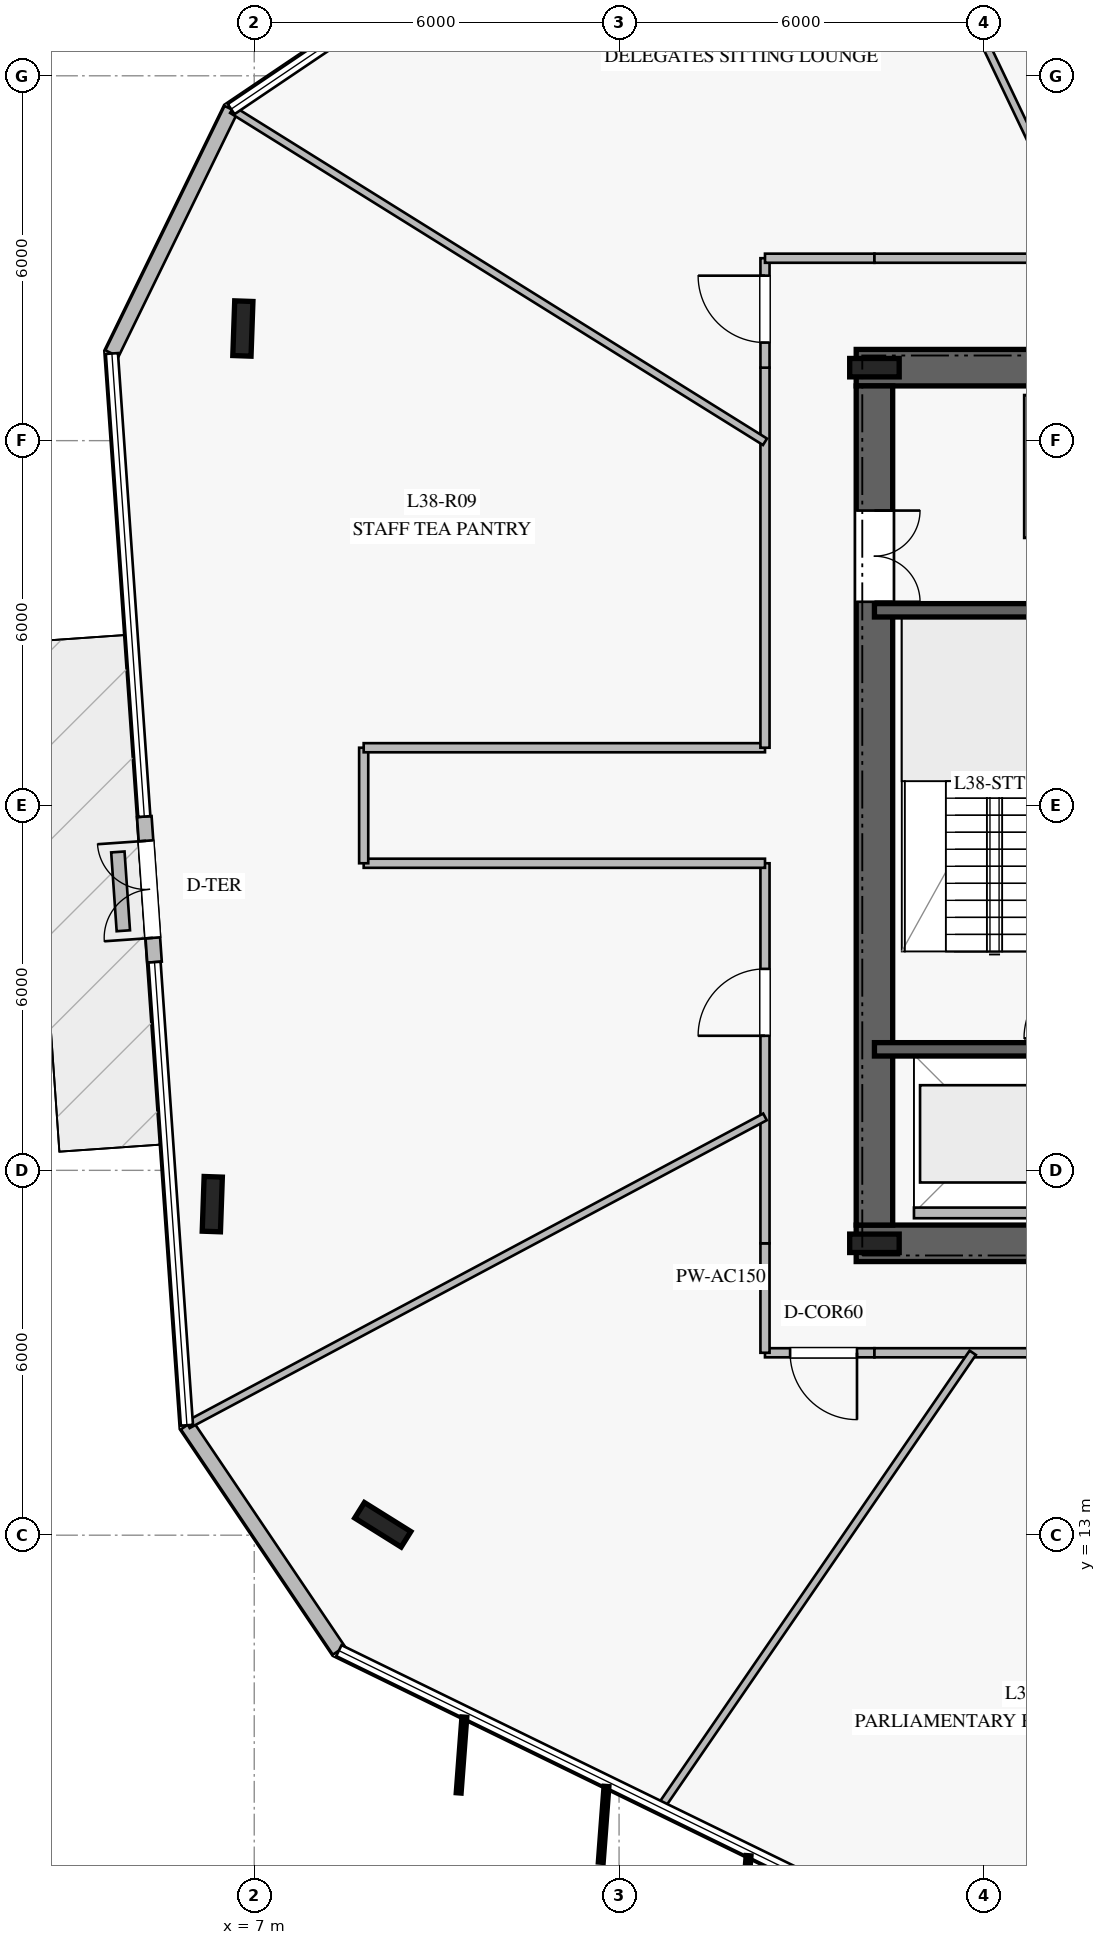
"""IFC4 building model, lengths in metres.
Left out: names, types, materials, properties, quantities, classifications, styles, units other than length and angle.
Written with IfcOpenShell. Run it as: python <this file> out.ifc"""

import sys

from ifc_helpers import new_model, si_unit, direction, frame, frame_2d, origin, origin_2d, place, context, subcontext, project, spatial, rectangle, i_section, extrude, element, fill, save


model = new_model("IFC4")
c1 = context("Model", 3, precision=1e-05, world=origin(), true_north=direction((0.0, 1.0)))
c2 = subcontext(c1, "Body", "Model", "MODEL_VIEW")
j1 = project(units=[si_unit("LENGTHUNIT", "METRE"), si_unit("PLANEANGLEUNIT", "RADIAN")], contexts=[c1])
p1 = place(None, origin())
s1 = spatial("IfcSite", under=j1, at=p1, CompositionType="ELEMENT")
p2 = place(p1, origin())
s2 = spatial("IfcBuilding", under=s1, at=p2, CompositionType="ELEMENT")
p3 = place(p2, frame((0.0, 0.0, 158.4)))
s3 = spatial("IfcBuildingStorey", under=s2, at=p3, CompositionType="ELEMENT", Elevation=158.4)
p4 = place(p3, frame((16.9, 17.8, 0.0), z_axis=(0.0, 0.0, 1.0), x_axis=(1.0, 0.0, 0.0)))
e1 = element("IfcWall", 1, at=p4, inside=s3, PredefinedType="SHEAR", context=c2, shape_type="SweptSolid", body=[
    extrude(rectangle(XDim=16.2, YDim=0.6, at=frame_2d((8.1, 0.0))), origin(), (0.0, 0.0, 1.0), 3.76),
])
p5 = place(p4, frame((5.05, 0.0, 0.0)))
e2 = element("IfcOpeningElement", 2, at=p5, cuts=e1, PredefinedType="OPENING", context=c2, shape_type="SweptSolid", body=[
    extrude(rectangle(XDim=1.2, YDim=2.25, at=frame_2d((0.6, 1.125))), frame((0.0, 0.31, 0.0), z_axis=(0.0, -1.0, 0.0), x_axis=(1.0, 0.0, 0.0)), (0.0, 0.0, 1.0), 0.62),
])
p6 = place(p4, frame((14.0, 0.0, 0.0)))
e3 = element("IfcOpeningElement", 3, at=p6, cuts=e1, PredefinedType="OPENING", context=c2, shape_type="SweptSolid", body=[
    extrude(rectangle(XDim=0.9, YDim=2.1, at=frame_2d((0.45, 1.05))), frame((0.0, 0.31, 0.0), z_axis=(0.0, -1.0, 0.0), x_axis=(1.0, 0.0, 0.0)), (0.0, 0.0, 1.0), 0.62),
])
p7 = place(p4, frame((9.25, 0.0, 0.0)))
e4 = element("IfcOpeningElement", 4, at=p7, cuts=e1, PredefinedType="OPENING", context=c2, shape_type="SweptSolid", body=[
    extrude(rectangle(XDim=1.1, YDim=2.2, at=frame_2d((0.55, 1.1))), frame((0.0, 0.31, 0.0), z_axis=(0.0, -1.0, 0.0), x_axis=(1.0, 0.0, 0.0)), (0.0, 0.0, 1.0), 0.62),
])
p8 = place(p3, frame((33.1, 32.2, 0.0), z_axis=(0.0, 0.0, 1.0), x_axis=(-1.0, 0.0, 0.0)))
e5 = element("IfcWall", 5, at=p8, inside=s3, PredefinedType="SHEAR", context=c2, shape_type="SweptSolid", body=[
    extrude(rectangle(XDim=16.2, YDim=0.6, at=frame_2d((8.1, 0.0))), origin(), (0.0, 0.0, 1.0), 3.76),
])
p9 = place(p8, frame((5.05, 0.0, 0.0)))
e6 = element("IfcOpeningElement", 6, at=p9, cuts=e5, PredefinedType="OPENING", context=c2, shape_type="SweptSolid", body=[
    extrude(rectangle(XDim=1.2, YDim=2.25, at=frame_2d((0.6, 1.125))), frame((0.0, 0.31, 0.0), z_axis=(0.0, -1.0, 0.0), x_axis=(1.0, 0.0, 0.0)), (0.0, 0.0, 1.0), 0.62),
])
p10 = place(p8, frame((11.85, 0.0, 0.0)))
e7 = element("IfcOpeningElement", 7, at=p10, cuts=e5, PredefinedType="OPENING", context=c2, shape_type="SweptSolid", body=[
    extrude(rectangle(XDim=1.1, YDim=2.2, at=frame_2d((0.55, 1.1))), frame((0.0, 0.31, 0.0), z_axis=(0.0, -1.0, 0.0), x_axis=(1.0, 0.0, 0.0)), (0.0, 0.0, 1.0), 0.62),
])
p11 = place(p8, frame((9.875, 0.0, 0.0)))
e8 = element("IfcOpeningElement", 8, at=p11, cuts=e5, PredefinedType="OPENING", context=c2, shape_type="SweptSolid", body=[
    extrude(rectangle(XDim=1.1, YDim=2.2, at=frame_2d((0.55, 1.1))), frame((0.0, 0.31, 0.0), z_axis=(0.0, -1.0, 0.0), x_axis=(1.0, 0.0, 0.0)), (0.0, 0.0, 1.0), 0.62),
])
p12 = place(p8, frame((7.9, 0.0, 0.0)))
e9 = element("IfcOpeningElement", 9, at=p12, cuts=e5, PredefinedType="OPENING", context=c2, shape_type="SweptSolid", body=[
    extrude(rectangle(XDim=1.1, YDim=2.2, at=frame_2d((0.55, 1.1))), frame((0.0, 0.31, 0.0), z_axis=(0.0, -1.0, 0.0), x_axis=(1.0, 0.0, 0.0)), (0.0, 0.0, 1.0), 0.62),
])
p13 = place(p3, frame((17.2, 31.9, 0.0), z_axis=(0.0, 0.0, 1.0), x_axis=(0.0, -1.0, 0.0)))
e10 = element("IfcWall", 10, at=p13, inside=s3, PredefinedType="SHEAR", context=c2, shape_type="SweptSolid", body=[
    extrude(rectangle(XDim=13.8, YDim=0.6, at=frame_2d((6.9, 0.0))), origin(), (0.0, 0.0, 1.0), 3.76),
])
p14 = place(p13, frame((2.05, 0.0, 0.0)))
e11 = element("IfcOpeningElement", 11, at=p14, cuts=e10, PredefinedType="OPENING", context=c2, shape_type="SweptSolid", body=[
    extrude(rectangle(XDim=1.5, YDim=2.2, at=frame_2d((0.75, 1.1))), frame((0.0, 0.31, 0.0), z_axis=(0.0, -1.0, 0.0), x_axis=(1.0, 0.0, 0.0)), (0.0, 0.0, 1.0), 0.62),
])
for number, where, z_axis, x_axis in (
    (12, (17.2, 17.8, 0.0), (0.0, 0.0, 1.0), (1.0, 0.0, 0.0)),
    (13, (17.2, 32.2, 0.0), (0.0, 0.0, 1.0), (1.0, 0.0, 0.0)),
):
    element("IfcColumn", number, at=place(p3, frame(where, z_axis=z_axis, x_axis=x_axis)), inside=s3, PredefinedType="COLUMN", context=c2, shape_type="SweptSolid", body=[
        extrude(i_section(OverallWidth=0.303, OverallDepth=0.814, WebThickness=0.021, FlangeThickness=0.04, at=origin_2d()), origin(), (0.0, 0.0, 1.0), 4.0),
    ])
for number, where, z_axis, x_axis in (
    (14, (17.2, 20.99, 0.0), (0.0, 0.0, 1.0), (1.0, 0.0, 0.0)),
    (15, (17.2, 28.21, 0.0), (0.0, 0.0, 1.0), (1.0, 0.0, 0.0)),
):
    element("IfcWall", number, at=place(p3, frame(where, z_axis=z_axis, x_axis=x_axis)), inside=s3, PredefinedType="SOLIDWALL", context=c2, shape_type="SweptSolid", body=[
        extrude(rectangle(XDim=3.72, YDim=0.22, at=frame_2d((1.86, 0.0))), origin(), (0.0, 0.0, 1.0), 3.76),
    ])
for number, where, z_axis, x_axis in (
    (16, (6.813, 32.844, 0.0), (0.0, 0.0, 1.0), (0.035, 0.999, 0.0)),
    (17, (6.31, 18.444, 0.0), (0.0, 0.0, 1.0), (0.035, 0.999, 0.0)),
    (18, (9.114, 13.171, 0.0), (0.0, 0.0, 1.0), (-0.848, 0.53, 0.0)),
):
    element("IfcColumn", number, at=place(p3, frame(where, z_axis=z_axis, x_axis=x_axis)), inside=s3, PredefinedType="COLUMN", context=c2, shape_type="SweptSolid", body=[
        extrude(i_section(OverallWidth=0.3, OverallDepth=0.9, WebThickness=0.019, FlangeThickness=0.035, at=origin_2d()), origin(), (0.0, 0.0, 1.0), 4.0),
    ])
p15 = place(p3, frame((6.62, 36.452, 0.0), z_axis=(0.0, 0.0, 1.0), x_axis=(-0.438566687479, -0.898698648399, 0.0)))
e19 = element("IfcWall", 19, at=p15, inside=s3, PredefinedType="STANDARD", context=c2, shape_type="SweptSolid", body=[
    extrude(rectangle(XDim=4.472, YDim=0.24, at=frame_2d((2.236, 0.0))), origin(), (0.0, 0.0, 1.0), 3.76),
])
p16 = place(p3, frame((5.192, 24.818, 0.0), z_axis=(0.0, 0.0, 1.0), x_axis=(0.070090302694, -0.997540650534, 0.0)))
e20 = element("IfcWall", 20, at=p16, inside=s3, PredefinedType="STANDARD", context=c2, shape_type="SweptSolid", body=[
    extrude(rectangle(XDim=2.4, YDim=0.24, at=frame_2d((1.2, 0.0))), origin(), (0.0, 0.0, 1.0), 3.76),
])
p17 = place(p16, frame((0.4, 0.0, 0.0)))
e21 = element("IfcOpeningElement", 21, at=p17, cuts=e20, PredefinedType="OPENING", context=c2, shape_type="SweptSolid", body=[
    extrude(rectangle(XDim=1.6, YDim=2.25, at=frame_2d((0.8, 1.125))), frame((0.0, 0.13, 0.0), z_axis=(0.0, -1.0, 0.0), x_axis=(1.0, 0.0, 0.0)), (0.0, 0.0, 1.0), 0.26),
])
p18 = place(p3, frame((5.893, 14.808, 0.0), z_axis=(0.0, 0.0, 1.0), x_axis=(0.559078804203, -0.82911452206, 0.0)))
e22 = element("IfcWall", 22, at=p18, inside=s3, PredefinedType="STANDARD", context=c2, shape_type="SweptSolid", body=[
    extrude(rectangle(XDim=4.47, YDim=0.24, at=frame_2d((2.235, 0.0))), origin(), (0.0, 0.0, 1.0), 3.76),
])
p19 = place(p3, frame((4.757, 24.236, 0.0), z_axis=(0.0, 0.0, 1.0), x_axis=(0.069150329694, -0.997606250934, 0.0)))
e23 = element("IfcWall", 23, at=p19, inside=s3, PredefinedType="USERDEFINED", context=c2, shape_type="SweptSolid", body=[
    extrude(rectangle(XDim=1.299, YDim=0.22, at=frame_2d((0.65, 0.0))), origin(), (0.0, 0.0, 1.0), 0.4),
])
p20 = place(p3, frame((19.75, 29.4, 0.0), z_axis=(0.0, 0.0, 1.0), x_axis=(0.0, 1.0, 0.0)))
e24 = element("IfcWall", 24, at=p20, inside=s3, PredefinedType="PARTITIONING", context=c2, shape_type="SweptSolid", body=[
    extrude(rectangle(XDim=2.35, YDim=0.175, at=frame_2d((1.175, 0.0))), origin(), (0.0, 0.0, 1.0), 3.76),
])
p21 = place(p3, frame((17.85, 18.3, 0.0), z_axis=(0.0, 0.0, 1.0), x_axis=(1.0, 0.0, 0.0)))
e25 = element("IfcWall", 25, at=p21, inside=s3, PredefinedType="PARTITIONING", context=c2, shape_type="SweptSolid", body=[
    extrude(rectangle(XDim=2.6, YDim=0.175, at=frame_2d((1.3, 0.0))), origin(), (0.0, 0.0, 1.0), 3.76),
])
p22 = place(p3, frame((17.2, 16.0, 0.0), z_axis=(0.0, 0.0, 1.0), x_axis=(-1.0, 0.0, 0.0)))
e26 = element("IfcWall", 26, at=p22, inside=s3, PredefinedType="PARTITIONING", context=c2, shape_type="SweptSolid", body=[
    extrude(rectangle(XDim=1.8, YDim=0.15, at=frame_2d((0.9, 0.0))), origin(), (0.0, 0.0, 1.0), 3.36),
])
p23 = place(p22, frame((0.287, 0.0, 0.0)))
e27 = element("IfcOpeningElement", 27, at=p23, cuts=e26, PredefinedType="OPENING", context=c2, shape_type="SweptSolid", body=[
    extrude(rectangle(XDim=1.1, YDim=2.2, at=frame_2d((0.55, 1.1))), frame((0.0, 0.085, 0.0), z_axis=(0.0, -1.0, 0.0), x_axis=(1.0, 0.0, 0.0)), (0.0, 0.0, 1.0), 0.17),
])
p24 = place(p3, frame((15.4, 16.0, 0.0), z_axis=(0.0, 0.0, 1.0), x_axis=(0.0, 1.0, 0.0)))
e28 = element("IfcWall", 28, at=p24, inside=s3, PredefinedType="PARTITIONING", context=c2, shape_type="SweptSolid", body=[
    extrude(rectangle(XDim=1.8, YDim=0.15, at=frame_2d((0.9, 0.0))), origin(), (0.0, 0.0, 1.0), 3.21),
])
p25 = place(p3, frame((15.4, 17.8, 0.0), z_axis=(0.0, 0.0, 1.0), x_axis=(0.0, 1.0, 0.0)))
e29 = element("IfcWall", 29, at=p25, inside=s3, PredefinedType="PARTITIONING", context=c2, shape_type="SweptSolid", body=[
    extrude(rectangle(XDim=6.25, YDim=0.15, at=frame_2d((3.125, 0.0))), origin(), (0.0, 0.0, 1.0), 3.21),
])
p26 = place(p25, frame((3.413, 0.0, 0.0)))
e30 = element("IfcOpeningElement", 30, at=p26, cuts=e29, PredefinedType="OPENING", context=c2, shape_type="SweptSolid", body=[
    extrude(rectangle(XDim=1.1, YDim=2.2, at=frame_2d((0.55, 1.1))), frame((0.0, 0.085, 0.0), z_axis=(0.0, -1.0, 0.0), x_axis=(1.0, 0.0, 0.0)), (0.0, 0.0, 1.0), 0.17),
])
p27 = place(p3, frame((15.4, 24.05, 0.0), z_axis=(0.0, 0.0, 1.0), x_axis=(-1.0, 0.0, 0.0)))
e31 = element("IfcWall", 31, at=p27, inside=s3, PredefinedType="PARTITIONING", context=c2, shape_type="SweptSolid", body=[
    extrude(rectangle(XDim=6.6, YDim=0.15, at=frame_2d((3.3, 0.0))), origin(), (0.0, 0.0, 1.0), 3.05),
])
p28 = place(p3, frame((8.8, 24.05, 0.0), z_axis=(0.0, 0.0, 1.0), x_axis=(0.0, 1.0, 0.0)))
e32 = element("IfcWall", 32, at=p28, inside=s3, PredefinedType="PARTITIONING", context=c2, shape_type="SweptSolid", body=[
    extrude(rectangle(XDim=1.9, YDim=0.15, at=frame_2d((0.95, 0.0))), origin(), (0.0, 0.0, 1.0), 3.25),
])
p29 = place(p3, frame((8.8, 25.95, 0.0), z_axis=(0.0, 0.0, 1.0), x_axis=(1.0, 0.0, 0.0)))
e33 = element("IfcWall", 33, at=p29, inside=s3, PredefinedType="PARTITIONING", context=c2, shape_type="SweptSolid", body=[
    extrude(rectangle(XDim=6.6, YDim=0.15, at=frame_2d((3.3, 0.0))), origin(), (0.0, 0.0, 1.0), 3.05),
])
p30 = place(p3, frame((15.4, 25.95, 0.0), z_axis=(0.0, 0.0, 1.0), x_axis=(0.0, 1.0, 0.0)))
e34 = element("IfcWall", 34, at=p30, inside=s3, PredefinedType="PARTITIONING", context=c2, shape_type="SweptSolid", body=[
    extrude(rectangle(XDim=6.25, YDim=0.15, at=frame_2d((3.125, 0.0))), origin(), (0.0, 0.0, 1.0), 3.21),
])
p31 = place(p3, frame((15.4, 32.2, 0.0), z_axis=(0.0, 0.0, 1.0), x_axis=(0.0, 1.0, 0.0)))
e35 = element("IfcWall", 35, at=p31, inside=s3, PredefinedType="PARTITIONING", context=c2, shape_type="SweptSolid", body=[
    extrude(rectangle(XDim=1.8, YDim=0.15, at=frame_2d((0.9, 0.0))), origin(), (0.0, 0.0, 1.0), 3.21),
])
p32 = place(p31, frame((0.413, 0.0, 0.0)))
e36 = element("IfcOpeningElement", 36, at=p32, cuts=e35, PredefinedType="OPENING", context=c2, shape_type="SweptSolid", body=[
    extrude(rectangle(XDim=1.1, YDim=2.2, at=frame_2d((0.55, 1.1))), frame((0.0, 0.085, 0.0), z_axis=(0.0, -1.0, 0.0), x_axis=(1.0, 0.0, 0.0)), (0.0, 0.0, 1.0), 0.17),
])
p33 = place(p3, frame((15.4, 34.0, 0.0), z_axis=(0.0, 0.0, 1.0), x_axis=(1.0, 0.0, 0.0)))
e37 = element("IfcWall", 37, at=p33, inside=s3, PredefinedType="PARTITIONING", context=c2, shape_type="SweptSolid", body=[
    extrude(rectangle(XDim=1.8, YDim=0.15, at=frame_2d((0.9, 0.0))), origin(), (0.0, 0.0, 1.0), 3.76),
])
p34 = place(p3, frame((17.2, 34.0, 0.0), z_axis=(0.0, 0.0, 1.0), x_axis=(1.0, 0.0, 0.0)))
e38 = element("IfcWall", 38, at=p34, inside=s3, PredefinedType="PARTITIONING", context=c2, shape_type="SweptSolid", body=[
    extrude(rectangle(XDim=6.85, YDim=0.15, at=frame_2d((3.425, 0.0))), origin(), (0.0, 0.0, 1.0), 3.21),
])
p35 = place(p34, frame((4.339, 0.0, 0.0)))
e39 = element("IfcOpeningElement", 39, at=p35, cuts=e38, PredefinedType="OPENING", context=c2, shape_type="SweptSolid", body=[
    extrude(rectangle(XDim=1.1, YDim=2.2, at=frame_2d((0.55, 1.1))), frame((0.0, 0.085, 0.0), z_axis=(0.0, -1.0, 0.0), x_axis=(1.0, 0.0, 0.0)), (0.0, 0.0, 1.0), 0.17),
])
p36 = place(p3, frame((24.05, 16.0, 0.0), z_axis=(0.0, 0.0, 1.0), x_axis=(-1.0, 0.0, 0.0)))
e40 = element("IfcWall", 40, at=p36, inside=s3, PredefinedType="PARTITIONING", context=c2, shape_type="SweptSolid", body=[
    extrude(rectangle(XDim=6.85, YDim=0.15, at=frame_2d((3.425, 0.0))), origin(), (0.0, 0.0, 1.0), 3.21),
])
p37 = place(p3, frame((20.705, 34.0, 0.0), z_axis=(0.0, 0.0, 1.0), x_axis=(-0.430753986645, 0.902469391719, 0.0)))
e41 = element("IfcWall", 41, at=p37, inside=s3, PredefinedType="PARTITIONING", context=c2, shape_type="SweptSolid", body=[
    extrude(rectangle(XDim=10.001, YDim=0.125, at=frame_2d((5.0, 0.0))), origin(), (0.0, 0.0, 1.0), 3.16),
])
p38 = place(p3, frame((15.4, 30.981, 0.0), z_axis=(0.0, 0.0, 1.0), x_axis=(-0.848716115213, 0.528848707833, 0.0)))
e42 = element("IfcWall", 42, at=p38, inside=s3, PredefinedType="PARTITIONING", context=c2, shape_type="SweptSolid", body=[
    extrude(rectangle(XDim=10.326, YDim=0.125, at=frame_2d((5.163, 0.0))), origin(), (0.0, 0.0, 1.0), 3.16),
])
p39 = place(p3, frame((15.4, 19.879, 0.0), z_axis=(0.0, 0.0, 1.0), x_axis=(-0.882346658186, -0.470600015712, 0.0)))
e43 = element("IfcWall", 43, at=p39, inside=s3, PredefinedType="PARTITIONING", context=c2, shape_type="SweptSolid", body=[
    extrude(rectangle(XDim=10.757, YDim=0.125, at=frame_2d((5.378, 0.0))), origin(), (0.0, 0.0, 1.0), 3.16),
])
p40 = place(p3, frame((18.817, 16.0, 0.0), z_axis=(0.0, 0.0, 1.0), x_axis=(-0.566244987329, -0.824236989175, 0.0)))
e44 = element("IfcWall", 44, at=p40, inside=s3, PredefinedType="PARTITIONING", context=c2, shape_type="SweptSolid", body=[
    extrude(rectangle(XDim=9.054, YDim=0.125, at=frame_2d((4.527, 0.0))), origin(), (0.0, 0.0, 1.0), 3.16),
])
p41 = place(p17, frame((1.6, 0.0, 0.0), z_axis=(0.0, 0.0, 1.0), x_axis=(-1.0, 0.0, 0.0)))
e45 = element("IfcDoor", 45, at=p41, inside=s3, OperationType="DOUBLE_DOOR_SINGLE_SWING", PredefinedType="DOOR", context=c2, shape_type="SweptSolid", body=[
    extrude(rectangle(XDim=1.6, YDim=2.25, at=frame_2d((0.8, 1.125))), frame((0.0, 0.025, 0.0), z_axis=(0.0, -1.0, 0.0), x_axis=(1.0, 0.0, 0.0)), (0.0, 0.0, 1.0), 0.05),
])
fill(e21, e45)
p42 = place(p14, origin())
e46 = element("IfcDoor", 46, at=p42, inside=s3, OperationType="DOUBLE_DOOR_SINGLE_SWING", PredefinedType="DOOR", context=c2, shape_type="SweptSolid", body=[
    extrude(rectangle(XDim=1.5, YDim=2.2, at=frame_2d((0.75, 1.1))), frame((0.0, 0.025, 0.0), z_axis=(0.0, -1.0, 0.0), x_axis=(1.0, 0.0, 0.0)), (0.0, 0.0, 1.0), 0.05),
])
fill(e11, e46)
p43 = place(p23, origin())
e47 = element("IfcDoor", 47, at=p43, inside=s3, OperationType="SINGLE_SWING_LEFT", PredefinedType="DOOR", context=c2, shape_type="SweptSolid", body=[
    extrude(rectangle(XDim=1.1, YDim=2.2, at=frame_2d((0.55, 1.1))), frame((0.0, 0.025, 0.0), z_axis=(0.0, -1.0, 0.0), x_axis=(1.0, 0.0, 0.0)), (0.0, 0.0, 1.0), 0.05),
])
fill(e27, e47)
p44 = place(p32, origin())
e48 = element("IfcDoor", 48, at=p44, inside=s3, OperationType="SINGLE_SWING_RIGHT", PredefinedType="DOOR", context=c2, shape_type="SweptSolid", body=[
    extrude(rectangle(XDim=1.1, YDim=2.2, at=frame_2d((0.55, 1.1))), frame((0.0, 0.025, 0.0), z_axis=(0.0, -1.0, 0.0), x_axis=(1.0, 0.0, 0.0)), (0.0, 0.0, 1.0), 0.05),
])
fill(e36, e48)
p45 = place(p26, origin())
e49 = element("IfcDoor", 49, at=p45, inside=s3, OperationType="SINGLE_SWING_LEFT", PredefinedType="DOOR", context=c2, shape_type="SweptSolid", body=[
    extrude(rectangle(XDim=1.1, YDim=2.2, at=frame_2d((0.55, 1.1))), frame((0.0, 0.025, 0.0), z_axis=(0.0, -1.0, 0.0), x_axis=(1.0, 0.0, 0.0)), (0.0, 0.0, 1.0), 0.05),
])
fill(e30, e49)
save(model, sys.argv[1])
